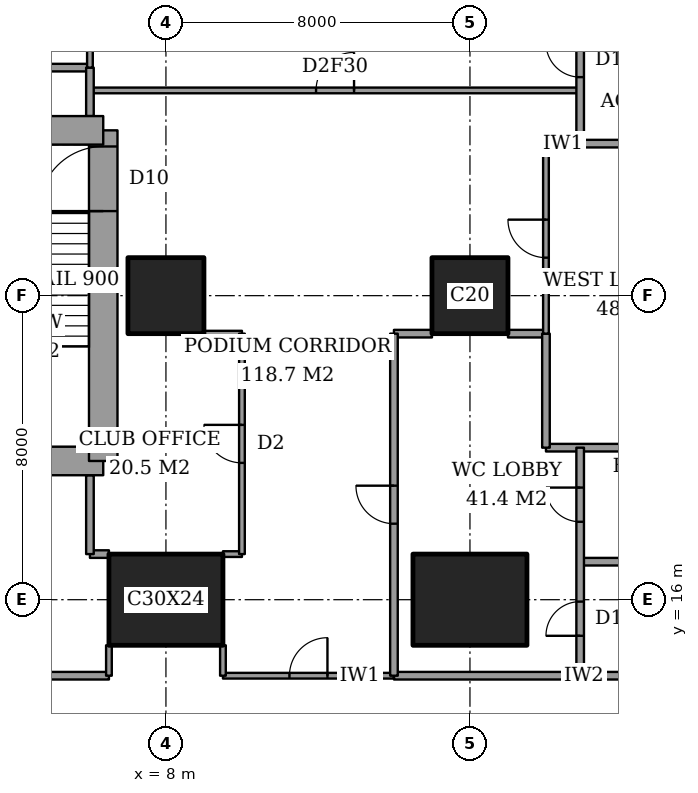
"""IFC4 building model, lengths in metres.
Left out: names, types, materials, properties, quantities, classifications, styles, units other than length and angle.
Written with IfcOpenShell. Run it as: python <this file> out.ifc"""

import sys

from ifc_helpers import new_model, si_unit, direction, frame, frame_2d, origin, origin_2d, place, context, subcontext, project, spatial, rectangle, extrude, element, fill, save


model = new_model("IFC4")
c1 = context("Model", 3, precision=1e-05, world=origin(), true_north=direction((0.0, 1.0)))
c2 = subcontext(c1, "Body", "Model", "MODEL_VIEW")
j1 = project(units=[si_unit("LENGTHUNIT", "METRE"), si_unit("PLANEANGLEUNIT", "RADIAN")], contexts=[c1])
p1 = place(None, origin())
s1 = spatial("IfcSite", under=j1, at=p1, CompositionType="ELEMENT")
p2 = place(p1, origin())
s2 = spatial("IfcBuilding", under=s1, at=p2, CompositionType="ELEMENT")
p3 = place(p2, frame((0.0, 0.0, 6.0)))
s3 = spatial("IfcBuildingStorey", under=s2, at=p3, CompositionType="ELEMENT", Elevation=6.0)
p4 = place(p3, frame((8.0, 16.0, 0.0), z_axis=(0.0, 0.0, 1.0), x_axis=(1.0, 0.0, 0.0)))
e1 = element("IfcColumn", 1, at=p4, inside=s3, PredefinedType="COLUMN", context=c2, shape_type="SweptSolid", body=[
    extrude(rectangle(XDim=3.0, YDim=2.4, at=origin_2d()), origin(), (0.0, 0.0, 1.0), 5.0),
])
p5 = place(p3, frame((8.0, 24.0, 0.0), z_axis=(0.0, 0.0, 1.0), x_axis=(1.0, 0.0, 0.0)))
e2 = element("IfcColumn", 2, at=p5, inside=s3, PredefinedType="COLUMN", context=c2, shape_type="SweptSolid", body=[
    extrude(rectangle(XDim=2.0, YDim=2.0, at=origin_2d()), origin(), (0.0, 0.0, 1.0), 5.0),
])
p6 = place(p3, frame((16.0, 16.0, 0.0), z_axis=(0.0, 0.0, 1.0), x_axis=(1.0, 0.0, 0.0)))
e3 = element("IfcColumn", 3, at=p6, inside=s3, PredefinedType="COLUMN", context=c2, shape_type="SweptSolid", body=[
    extrude(rectangle(XDim=3.0, YDim=2.4, at=origin_2d()), origin(), (0.0, 0.0, 1.0), 5.0),
])
p7 = place(p3, frame((16.0, 24.0, 0.0), z_axis=(0.0, 0.0, 1.0), x_axis=(1.0, 0.0, 0.0)))
e4 = element("IfcColumn", 4, at=p7, inside=s3, PredefinedType="COLUMN", context=c2, shape_type="SweptSolid", body=[
    extrude(rectangle(XDim=2.0, YDim=2.0, at=origin_2d()), origin(), (0.0, 0.0, 1.0), 5.0),
])
p8 = place(p3, frame((1.9, 19.65, 0.0), z_axis=(0.0, 0.0, 1.0), x_axis=(1.0, 0.0, 0.0)))
e5 = element("IfcWall", 5, at=p8, inside=s3, PredefinedType="SHEAR", context=c2, shape_type="SweptSolid", body=[
    extrude(rectangle(XDim=4.45, YDim=0.75, at=frame_2d((2.225, 0.0))), origin(), (0.0, 0.0, 1.0), 5.0),
])
p9 = place(p3, frame((6.35, 19.65, 0.0), z_axis=(0.0, 0.0, 1.0), x_axis=(0.0, 1.0, 0.0)))
e6 = element("IfcWall", 6, at=p9, inside=s3, PredefinedType="SHEAR", context=c2, shape_type="SweptSolid", body=[
    extrude(rectangle(XDim=8.7, YDim=0.75, at=frame_2d((4.35, 0.0))), origin(), (0.0, 0.0, 1.0), 5.0),
])
p10 = place(p9, frame((6.575, 0.0, 0.0)))
e7 = element("IfcOpeningElement", 7, at=p10, cuts=e6, PredefinedType="OPENING", context=c2, shape_type="SweptSolid", body=[
    extrude(rectangle(XDim=1.7, YDim=2.1, at=frame_2d((0.85, 1.05))), frame((0.0, 0.385, 0.0), z_axis=(0.0, -1.0, 0.0), x_axis=(1.0, 0.0, 0.0)), (0.0, 0.0, 1.0), 0.77),
])
p11 = place(p3, frame((6.35, 28.35, 0.0), z_axis=(0.0, 0.0, 1.0), x_axis=(-1.0, 0.0, 0.0)))
e8 = element("IfcWall", 8, at=p11, inside=s3, PredefinedType="SHEAR", context=c2, shape_type="SweptSolid", body=[
    extrude(rectangle(XDim=4.45, YDim=0.75, at=frame_2d((2.225, 0.0))), origin(), (0.0, 0.0, 1.0), 5.0),
])
p12 = place(p3, frame((0.0, 14.0, 0.0), z_axis=(0.0, 0.0, 1.0), x_axis=(1.0, 0.0, 0.0)))
e9 = element("IfcWall", 9, at=p12, inside=s3, PredefinedType="PARTITIONING", context=c2, shape_type="SweptSolid", body=[
    extrude(rectangle(XDim=6.5, YDim=0.2, at=frame_2d((3.25, 0.0))), origin(), (0.0, 0.0, 1.0), 4.7),
])
p13 = place(p3, frame((14.0, 14.0, 0.0), z_axis=(0.0, 0.0, 1.0), x_axis=(1.0, 0.0, 0.0)))
e10 = element("IfcWall", 10, at=p13, inside=s3, PredefinedType="PARTITIONING", context=c2, shape_type="SweptSolid", body=[
    extrude(rectangle(XDim=10.0, YDim=0.2, at=frame_2d((5.0, 0.0))), origin(), (0.0, 0.0, 1.0), 4.7),
])
p14 = place(p3, frame((9.5, 14.0, 0.0), z_axis=(0.0, 0.0, 1.0), x_axis=(1.0, 0.0, 0.0)))
e11 = element("IfcWall", 11, at=p14, inside=s3, PredefinedType="PARTITIONING", context=c2, shape_type="SweptSolid", body=[
    extrude(rectangle(XDim=4.5, YDim=0.15, at=frame_2d((2.25, 0.0))), origin(), (0.0, 0.0, 1.0), 4.7),
])
p15 = place(p14, frame((1.75, 0.0, 0.0)))
e12 = element("IfcOpeningElement", 12, at=p15, cuts=e11, PredefinedType="OPENING", context=c2, shape_type="SweptSolid", body=[
    extrude(rectangle(XDim=1.0, YDim=2.1, at=frame_2d((0.5, 1.05))), frame((0.0, 0.085, 0.0), z_axis=(0.0, -1.0, 0.0), x_axis=(1.0, 0.0, 0.0)), (0.0, 0.0, 1.0), 0.17),
])
p16 = place(p3, frame((18.9, 17.0, 0.0), z_axis=(0.0, 0.0, 1.0), x_axis=(1.0, 0.0, 0.0)))
e13 = element("IfcWall", 13, at=p16, inside=s3, PredefinedType="PARTITIONING", context=c2, shape_type="SweptSolid", body=[
    extrude(rectangle(XDim=5.1, YDim=0.2, at=frame_2d((2.55, 0.0))), origin(), (0.0, 0.0, 1.0), 4.7),
])
p17 = place(p3, frame((6.0, 17.2, 0.0), z_axis=(0.0, 0.0, 1.0), x_axis=(1.0, 0.0, 0.0)))
e14 = element("IfcWall", 14, at=p17, inside=s3, PredefinedType="PARTITIONING", context=c2, shape_type="SweptSolid", body=[
    extrude(rectangle(XDim=0.5, YDim=0.2, at=frame_2d((0.25, 0.0))), origin(), (0.0, 0.0, 1.0), 4.7),
])
p18 = place(p3, frame((9.5, 17.2, 0.0), z_axis=(0.0, 0.0, 1.0), x_axis=(1.0, 0.0, 0.0)))
e15 = element("IfcWall", 15, at=p18, inside=s3, PredefinedType="PARTITIONING", context=c2, shape_type="SweptSolid", body=[
    extrude(rectangle(XDim=0.5, YDim=0.15, at=frame_2d((0.25, 0.0))), origin(), (0.0, 0.0, 1.0), 4.7),
])
p19 = place(p3, frame((18.0, 20.0, 0.0), z_axis=(0.0, 0.0, 1.0), x_axis=(1.0, 0.0, 0.0)))
e16 = element("IfcWall", 16, at=p19, inside=s3, PredefinedType="PARTITIONING", context=c2, shape_type="SweptSolid", body=[
    extrude(rectangle(XDim=6.0, YDim=0.2, at=frame_2d((3.0, 0.0))), origin(), (0.0, 0.0, 1.0), 4.7),
])
for number, where, z_axis, x_axis in (
    (17, (14.0, 23.0, 0.0), (0.0, 0.0, 1.0), (1.0, 0.0, 0.0)),
    (18, (17.0, 23.0, 0.0), (0.0, 0.0, 1.0), (1.0, 0.0, 0.0)),
):
    element("IfcWall", number, at=place(p3, frame(where, z_axis=z_axis, x_axis=x_axis)), inside=s3, PredefinedType="PARTITIONING", context=c2, shape_type="SweptSolid", body=[
        extrude(rectangle(XDim=1.0, YDim=0.2, at=frame_2d((0.5, 0.0))), origin(), (0.0, 0.0, 1.0), 4.7),
    ])
p20 = place(p3, frame((9.0, 23.0, 0.0), z_axis=(0.0, 0.0, 1.0), x_axis=(1.0, 0.0, 0.0)))
e19 = element("IfcWall", 19, at=p20, inside=s3, PredefinedType="PARTITIONING", context=c2, shape_type="SweptSolid", body=[
    extrude(rectangle(XDim=1.0, YDim=0.15, at=frame_2d((0.5, 0.0))), origin(), (0.0, 0.0, 1.0), 4.7),
])
p21 = place(p3, frame((18.9, 28.0, 0.0), z_axis=(0.0, 0.0, 1.0), x_axis=(1.0, 0.0, 0.0)))
e20 = element("IfcWall", 20, at=p21, inside=s3, PredefinedType="PARTITIONING", context=c2, shape_type="SweptSolid", body=[
    extrude(rectangle(XDim=5.1, YDim=0.2, at=frame_2d((2.55, 0.0))), origin(), (0.0, 0.0, 1.0), 4.7),
])
p22 = place(p3, frame((18.0, 28.0, 0.0), z_axis=(0.0, 0.0, 1.0), x_axis=(1.0, 0.0, 0.0)))
e21 = element("IfcWall", 21, at=p22, inside=s3, PredefinedType="PARTITIONING", context=c2, shape_type="SweptSolid", body=[
    extrude(rectangle(XDim=0.9, YDim=0.15, at=frame_2d((0.45, 0.0))), origin(), (0.0, 0.0, 1.0), 4.7),
])
p23 = place(p3, frame((6.0, 29.4, 0.0), z_axis=(0.0, 0.0, 1.0), x_axis=(1.0, 0.0, 0.0)))
e22 = element("IfcWall", 22, at=p23, inside=s3, PredefinedType="PARTITIONING", context=c2, shape_type="SweptSolid", body=[
    extrude(rectangle(XDim=12.9, YDim=0.15, at=frame_2d((6.45, 0.0))), origin(), (0.0, 0.0, 1.0), 4.7),
])
p24 = place(p23, frame((5.95, 0.0, 0.0)))
e23 = element("IfcOpeningElement", 23, at=p24, cuts=e22, PredefinedType="OPENING", context=c2, shape_type="SweptSolid", body=[
    extrude(rectangle(XDim=1.0, YDim=2.1, at=frame_2d((0.5, 1.05))), frame((0.0, 0.085, 0.0), z_axis=(0.0, -1.0, 0.0), x_axis=(1.0, 0.0, 0.0)), (0.0, 0.0, 1.0), 0.17),
])
p25 = place(p3, frame((0.0, 30.0, 0.0), z_axis=(0.0, 0.0, 1.0), x_axis=(1.0, 0.0, 0.0)))
e24 = element("IfcWall", 24, at=p25, inside=s3, PredefinedType="PARTITIONING", context=c2, shape_type="SweptSolid", body=[
    extrude(rectangle(XDim=6.0, YDim=0.2, at=frame_2d((3.0, 0.0))), origin(), (0.0, 0.0, 1.0), 4.7),
])
p26 = place(p3, frame((6.0, 17.2, 0.0), z_axis=(0.0, 0.0, 1.0), x_axis=(0.0, 1.0, 0.0)))
e25 = element("IfcWall", 25, at=p26, inside=s3, PredefinedType="PARTITIONING", context=c2, shape_type="SweptSolid", body=[
    extrude(rectangle(XDim=2.075, YDim=0.2, at=frame_2d((1.038, 0.0))), origin(), (0.0, 0.0, 1.0), 4.7),
])
p27 = place(p3, frame((6.0, 28.725, 0.0), z_axis=(0.0, 0.0, 1.0), x_axis=(0.0, 1.0, 0.0)))
e26 = element("IfcWall", 26, at=p27, inside=s3, PredefinedType="PARTITIONING", context=c2, shape_type="SweptSolid", body=[
    extrude(rectangle(XDim=1.275, YDim=0.2, at=frame_2d((0.637, 0.0))), origin(), (0.0, 0.0, 1.0), 4.7),
])
p28 = place(p3, frame((6.0, 30.0, 0.0), z_axis=(0.0, 0.0, 1.0), x_axis=(0.0, 1.0, 0.0)))
e27 = element("IfcWall", 27, at=p28, inside=s3, PredefinedType="PARTITIONING", context=c2, shape_type="SweptSolid", body=[
    extrude(rectangle(XDim=4.0, YDim=0.15, at=frame_2d((2.0, 0.0))), origin(), (0.0, 0.0, 1.0), 4.7),
])
for number, where, z_axis, x_axis in (
    (28, (6.5, 14.0, 0.0), (0.0, 0.0, 1.0), (0.0, 1.0, 0.0)),
    (29, (9.5, 14.0, 0.0), (0.0, 0.0, 1.0), (0.0, 1.0, 0.0)),
):
    element("IfcWall", number, at=place(p3, frame(where, z_axis=z_axis, x_axis=x_axis)), inside=s3, PredefinedType="PARTITIONING", context=c2, shape_type="SweptSolid", body=[
        extrude(rectangle(XDim=0.8, YDim=0.15, at=frame_2d((0.4, 0.0))), origin(), (0.0, 0.0, 1.0), 4.7),
    ])
p29 = place(p3, frame((10.0, 17.2, 0.0), z_axis=(0.0, 0.0, 1.0), x_axis=(0.0, 1.0, 0.0)))
e30 = element("IfcWall", 30, at=p29, inside=s3, PredefinedType="PARTITIONING", context=c2, shape_type="SweptSolid", body=[
    extrude(rectangle(XDim=5.8, YDim=0.15, at=frame_2d((2.9, 0.0))), origin(), (0.0, 0.0, 1.0), 4.7),
])
p30 = place(p29, frame((2.4, 0.0, 0.0)))
e31 = element("IfcOpeningElement", 31, at=p30, cuts=e30, PredefinedType="OPENING", context=c2, shape_type="SweptSolid", body=[
    extrude(rectangle(XDim=1.0, YDim=2.1, at=frame_2d((0.5, 1.05))), frame((0.0, 0.085, 0.0), z_axis=(0.0, -1.0, 0.0), x_axis=(1.0, 0.0, 0.0)), (0.0, 0.0, 1.0), 0.17),
])
p31 = place(p3, frame((14.0, 14.0, 0.0), z_axis=(0.0, 0.0, 1.0), x_axis=(0.0, 1.0, 0.0)))
e32 = element("IfcWall", 32, at=p31, inside=s3, PredefinedType="PARTITIONING", context=c2, shape_type="SweptSolid", body=[
    extrude(rectangle(XDim=9.0, YDim=0.2, at=frame_2d((4.5, 0.0))), origin(), (0.0, 0.0, 1.0), 4.7),
])
p32 = place(p31, frame((4.0, 0.0, 0.0)))
e33 = element("IfcOpeningElement", 33, at=p32, cuts=e32, PredefinedType="OPENING", context=c2, shape_type="SweptSolid", body=[
    extrude(rectangle(XDim=1.0, YDim=2.1, at=frame_2d((0.5, 1.05))), frame((0.0, 0.11, 0.0), z_axis=(0.0, -1.0, 0.0), x_axis=(1.0, 0.0, 0.0)), (0.0, 0.0, 1.0), 0.22),
])
p33 = place(p3, frame((18.0, 20.0, 0.0), z_axis=(0.0, 0.0, 1.0), x_axis=(0.0, 1.0, 0.0)))
e34 = element("IfcWall", 34, at=p33, inside=s3, PredefinedType="PARTITIONING", context=c2, shape_type="SweptSolid", body=[
    extrude(rectangle(XDim=3.0, YDim=0.2, at=frame_2d((1.5, 0.0))), origin(), (0.0, 0.0, 1.0), 4.7),
])
p34 = place(p3, frame((18.0, 23.0, 0.0), z_axis=(0.0, 0.0, 1.0), x_axis=(0.0, 1.0, 0.0)))
e35 = element("IfcWall", 35, at=p34, inside=s3, PredefinedType="PARTITIONING", context=c2, shape_type="SweptSolid", body=[
    extrude(rectangle(XDim=5.0, YDim=0.15, at=frame_2d((2.5, 0.0))), origin(), (0.0, 0.0, 1.0), 4.7),
])
p35 = place(p34, frame((2.0, 0.0, 0.0)))
e36 = element("IfcOpeningElement", 36, at=p35, cuts=e35, PredefinedType="OPENING", context=c2, shape_type="SweptSolid", body=[
    extrude(rectangle(XDim=1.0, YDim=2.1, at=frame_2d((0.5, 1.05))), frame((0.0, 0.085, 0.0), z_axis=(0.0, -1.0, 0.0), x_axis=(1.0, 0.0, 0.0)), (0.0, 0.0, 1.0), 0.17),
])
p36 = place(p3, frame((18.9, 14.0, 0.0), z_axis=(0.0, 0.0, 1.0), x_axis=(0.0, 1.0, 0.0)))
e37 = element("IfcWall", 37, at=p36, inside=s3, PredefinedType="PARTITIONING", context=c2, shape_type="SweptSolid", body=[
    extrude(rectangle(XDim=6.0, YDim=0.2, at=frame_2d((3.0, 0.0))), origin(), (0.0, 0.0, 1.0), 4.7),
])
p37 = place(p36, frame((1.05, 0.0, 0.0)))
e38 = element("IfcOpeningElement", 38, at=p37, cuts=e37, PredefinedType="OPENING", context=c2, shape_type="SweptSolid", body=[
    extrude(rectangle(XDim=0.9, YDim=2.1, at=frame_2d((0.45, 1.05))), frame((0.0, 0.11, 0.0), z_axis=(0.0, -1.0, 0.0), x_axis=(1.0, 0.0, 0.0)), (0.0, 0.0, 1.0), 0.22),
])
p38 = place(p36, frame((4.05, 0.0, 0.0)))
e39 = element("IfcOpeningElement", 39, at=p38, cuts=e37, PredefinedType="OPENING", context=c2, shape_type="SweptSolid", body=[
    extrude(rectangle(XDim=0.9, YDim=2.1, at=frame_2d((0.45, 1.05))), frame((0.0, 0.11, 0.0), z_axis=(0.0, -1.0, 0.0), x_axis=(1.0, 0.0, 0.0)), (0.0, 0.0, 1.0), 0.22),
])
p39 = place(p3, frame((18.9, 28.0, 0.0), z_axis=(0.0, 0.0, 1.0), x_axis=(0.0, 1.0, 0.0)))
e40 = element("IfcWall", 40, at=p39, inside=s3, PredefinedType="PARTITIONING", context=c2, shape_type="SweptSolid", body=[
    extrude(rectangle(XDim=3.0, YDim=0.2, at=frame_2d((1.5, 0.0))), origin(), (0.0, 0.0, 1.0), 4.7),
])
p40 = place(p39, frame((1.75, 0.0, 0.0)))
e41 = element("IfcOpeningElement", 41, at=p40, cuts=e40, PredefinedType="OPENING", context=c2, shape_type="SweptSolid", body=[
    extrude(rectangle(XDim=0.9, YDim=2.1, at=frame_2d((0.45, 1.05))), frame((0.0, 0.11, 0.0), z_axis=(0.0, -1.0, 0.0), x_axis=(1.0, 0.0, 0.0)), (0.0, 0.0, 1.0), 0.22),
])
p41 = place(p15, origin())
e42 = element("IfcDoor", 42, at=p41, inside=s3, OperationType="SINGLE_SWING_LEFT", PredefinedType="DOOR", context=c2, shape_type="SweptSolid", body=[
    extrude(rectangle(XDim=1.0, YDim=2.1, at=frame_2d((0.5, 1.05))), frame((0.0, 0.025, 0.0), z_axis=(0.0, -1.0, 0.0), x_axis=(1.0, 0.0, 0.0)), (0.0, 0.0, 1.0), 0.05),
])
fill(e12, e42)
p42 = place(p30, origin())
e43 = element("IfcDoor", 43, at=p42, inside=s3, OperationType="SINGLE_SWING_LEFT", PredefinedType="DOOR", context=c2, shape_type="SweptSolid", body=[
    extrude(rectangle(XDim=1.0, YDim=2.1, at=frame_2d((0.5, 1.05))), frame((0.0, 0.025, 0.0), z_axis=(0.0, -1.0, 0.0), x_axis=(1.0, 0.0, 0.0)), (0.0, 0.0, 1.0), 0.05),
])
fill(e31, e43)
p43 = place(p32, origin())
e44 = element("IfcDoor", 44, at=p43, inside=s3, OperationType="SINGLE_SWING_LEFT", PredefinedType="DOOR", context=c2, shape_type="SweptSolid", body=[
    extrude(rectangle(XDim=1.0, YDim=2.1, at=frame_2d((0.5, 1.05))), frame((0.0, 0.025, 0.0), z_axis=(0.0, -1.0, 0.0), x_axis=(1.0, 0.0, 0.0)), (0.0, 0.0, 1.0), 0.05),
])
fill(e33, e44)
p44 = place(p35, origin())
e45 = element("IfcDoor", 45, at=p44, inside=s3, OperationType="SINGLE_SWING_LEFT", PredefinedType="DOOR", context=c2, shape_type="SweptSolid", body=[
    extrude(rectangle(XDim=1.0, YDim=2.1, at=frame_2d((0.5, 1.05))), frame((0.0, 0.025, 0.0), z_axis=(0.0, -1.0, 0.0), x_axis=(1.0, 0.0, 0.0)), (0.0, 0.0, 1.0), 0.05),
])
fill(e36, e45)
p45 = place(p37, origin())
e46 = element("IfcDoor", 46, at=p45, inside=s3, OperationType="SINGLE_SWING_RIGHT", PredefinedType="DOOR", context=c2, shape_type="SweptSolid", body=[
    extrude(rectangle(XDim=0.9, YDim=2.1, at=frame_2d((0.45, 1.05))), frame((0.0, 0.025, 0.0), z_axis=(0.0, -1.0, 0.0), x_axis=(1.0, 0.0, 0.0)), (0.0, 0.0, 1.0), 0.05),
])
fill(e38, e46)
p46 = place(p38, origin())
e47 = element("IfcDoor", 47, at=p46, inside=s3, OperationType="SINGLE_SWING_LEFT", PredefinedType="DOOR", context=c2, shape_type="SweptSolid", body=[
    extrude(rectangle(XDim=0.9, YDim=2.1, at=frame_2d((0.45, 1.05))), frame((0.0, 0.025, 0.0), z_axis=(0.0, -1.0, 0.0), x_axis=(1.0, 0.0, 0.0)), (0.0, 0.0, 1.0), 0.05),
])
fill(e39, e47)
p47 = place(p40, origin())
e48 = element("IfcDoor", 48, at=p47, inside=s3, OperationType="SINGLE_SWING_LEFT", PredefinedType="DOOR", context=c2, shape_type="SweptSolid", body=[
    extrude(rectangle(XDim=0.9, YDim=2.1, at=frame_2d((0.45, 1.05))), frame((0.0, 0.025, 0.0), z_axis=(0.0, -1.0, 0.0), x_axis=(1.0, 0.0, 0.0)), (0.0, 0.0, 1.0), 0.05),
])
fill(e41, e48)
p48 = place(p24, origin())
e49 = element("IfcDoor", 49, at=p48, inside=s3, OperationType="SINGLE_SWING_LEFT", PredefinedType="DOOR", context=c2, shape_type="SweptSolid", body=[
    extrude(rectangle(XDim=1.0, YDim=2.1, at=frame_2d((0.5, 1.05))), frame((0.0, 0.025, 0.0), z_axis=(0.0, -1.0, 0.0), x_axis=(1.0, 0.0, 0.0)), (0.0, 0.0, 1.0), 0.05),
])
fill(e23, e49)
p49 = place(p10, origin())
e50 = element("IfcDoor", 50, at=p49, inside=s3, OperationType="DOUBLE_DOOR_SINGLE_SWING", PredefinedType="DOOR", context=c2, shape_type="SweptSolid", body=[
    extrude(rectangle(XDim=1.7, YDim=2.1, at=frame_2d((0.85, 1.05))), frame((0.0, 0.025, 0.0), z_axis=(0.0, -1.0, 0.0), x_axis=(1.0, 0.0, 0.0)), (0.0, 0.0, 1.0), 0.05),
])
fill(e7, e50)
save(model, sys.argv[1])
